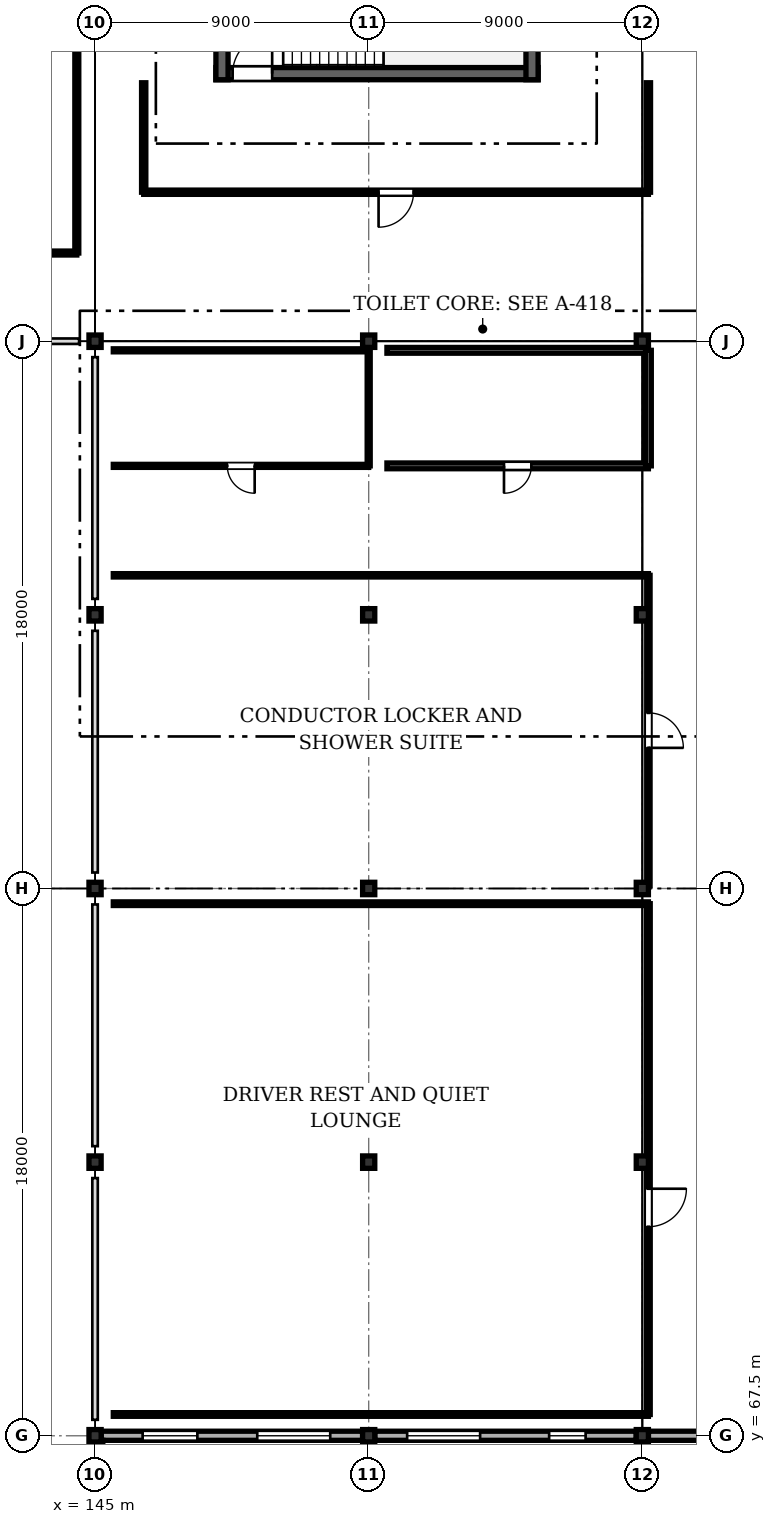
"""IFC4 building model, lengths in metres.
Left out: names, types, materials, properties, quantities, classifications, styles, units other than length and angle.
Written with IfcOpenShell. Run it as: python <this file> out.ifc"""

import sys

from ifc_helpers import new_model, si_unit, direction, frame, frame_2d, origin, origin_2d, place, context, subcontext, project, spatial, rectangle, i_section, extrude, element, fill, save


model = new_model("IFC4")
c1 = context("Model", 3, precision=1e-05, world=origin(), true_north=direction((0.0, 1.0)))
c2 = subcontext(c1, "Body", "Model", "MODEL_VIEW")
j1 = project(units=[si_unit("LENGTHUNIT", "METRE"), si_unit("PLANEANGLEUNIT", "RADIAN")], contexts=[c1])
p1 = place(None, origin())
s1 = spatial("IfcSite", under=j1, at=p1, CompositionType="ELEMENT")
p2 = place(p1, origin())
s2 = spatial("IfcBuilding", under=s1, at=p2, CompositionType="ELEMENT")
p3 = place(p2, frame((0.0, 0.0, 10.8)))
s3 = spatial("IfcBuildingStorey", under=s2, at=p3, CompositionType="ELEMENT", Elevation=10.8)
for number, where, z_axis, x_axis in (
    (1, (145.0, 67.5, 0.0), (0.0, 0.0, 1.0), (1.0, 0.0, 0.0)),
    (2, (145.0, 76.5, 0.0), (0.0, 0.0, 1.0), (1.0, 0.0, 0.0)),
    (3, (145.0, 85.5, 0.0), (0.0, 0.0, 1.0), (1.0, 0.0, 0.0)),
    (4, (145.0, 94.5, 0.0), (0.0, 0.0, 1.0), (1.0, 0.0, 0.0)),
    (5, (145.0, 103.5, 0.0), (0.0, 0.0, 1.0), (1.0, 0.0, 0.0)),
    (6, (154.0, 67.5, 0.0), (0.0, 0.0, 1.0), (1.0, 0.0, 0.0)),
    (7, (154.0, 76.5, 0.0), (0.0, 0.0, 1.0), (1.0, 0.0, 0.0)),
    (8, (154.0, 85.5, 0.0), (0.0, 0.0, 1.0), (1.0, 0.0, 0.0)),
    (9, (154.0, 94.5, 0.0), (0.0, 0.0, 1.0), (1.0, 0.0, 0.0)),
    (10, (154.0, 103.5, 0.0), (0.0, 0.0, 1.0), (1.0, 0.0, 0.0)),
    (11, (163.0, 67.5, 0.0), (0.0, 0.0, 1.0), (1.0, 0.0, 0.0)),
    (12, (163.0, 76.5, 0.0), (0.0, 0.0, 1.0), (1.0, 0.0, 0.0)),
    (13, (163.0, 85.5, 0.0), (0.0, 0.0, 1.0), (1.0, 0.0, 0.0)),
    (14, (163.0, 94.5, 0.0), (0.0, 0.0, 1.0), (1.0, 0.0, 0.0)),
    (15, (163.0, 103.5, 0.0), (0.0, 0.0, 1.0), (1.0, 0.0, 0.0)),
):
    element("IfcColumn", number, at=place(p3, frame(where, z_axis=z_axis, x_axis=x_axis)), inside=s3, PredefinedType="COLUMN", context=c2, shape_type="SweptSolid", body=[
        extrude(i_section(OverallWidth=0.4, OverallDepth=0.408, WebThickness=0.021, FlangeThickness=0.021, FilletRadius=0.022, at=origin_2d()), origin(), (0.0, 0.0, 1.0), 3.6),
    ])
p4 = place(p3, frame((171.8, 67.5, 0.0), z_axis=(0.0, 0.0, 1.0), x_axis=(-1.0, 0.0, 0.0)))
e16 = element("IfcWall", 16, at=p4, inside=s3, PredefinedType="SOLIDWALL", context=c2, shape_type="SweptSolid", body=[
    extrude(rectangle(XDim=8.6, YDim=0.3, at=frame_2d((4.3, 0.0))), origin(), (0.0, 0.0, 1.0), 2.915),
])
p5 = place(p4, frame((1.515, 0.0, 0.9)))
e17 = element("IfcOpeningElement", 17, at=p5, cuts=e16, PredefinedType="OPENING", context=c2, shape_type="SweptSolid", body=[
    extrude(rectangle(XDim=1.5, YDim=1.6, at=frame_2d((0.75, 0.8))), frame((0.0, 0.16, 0.0), z_axis=(0.0, -1.0, 0.0), x_axis=(1.0, 0.0, 0.0)), (0.0, 0.0, 1.0), 0.32),
])
p6 = place(p4, frame((5.735, 0.0, 0.9)))
e18 = element("IfcOpeningElement", 18, at=p6, cuts=e16, PredefinedType="OPENING", context=c2, shape_type="SweptSolid", body=[
    extrude(rectangle(XDim=1.2, YDim=1.6, at=frame_2d((0.6, 0.8))), frame((0.0, 0.16, 0.0), z_axis=(0.0, -1.0, 0.0), x_axis=(1.0, 0.0, 0.0)), (0.0, 0.0, 1.0), 0.32),
])
p7 = place(p3, frame((162.8, 67.5, 0.0), z_axis=(0.0, 0.0, 1.0), x_axis=(-1.0, 0.0, 0.0)))
e19 = element("IfcWall", 19, at=p7, inside=s3, PredefinedType="SOLIDWALL", context=c2, shape_type="SweptSolid", body=[
    extrude(rectangle(XDim=8.6, YDim=0.3, at=frame_2d((4.3, 0.0))), origin(), (0.0, 0.0, 1.0), 2.915),
])
p8 = place(p7, frame((1.665, 0.0, 0.9)))
e20 = element("IfcOpeningElement", 20, at=p8, cuts=e19, PredefinedType="OPENING", context=c2, shape_type="SweptSolid", body=[
    extrude(rectangle(XDim=1.2, YDim=1.6, at=frame_2d((0.6, 0.8))), frame((0.0, 0.16, 0.0), z_axis=(0.0, -1.0, 0.0), x_axis=(1.0, 0.0, 0.0)), (0.0, 0.0, 1.0), 0.32),
])
p9 = place(p7, frame((5.135, 0.0, 0.9)))
e21 = element("IfcOpeningElement", 21, at=p9, cuts=e19, PredefinedType="OPENING", context=c2, shape_type="SweptSolid", body=[
    extrude(rectangle(XDim=2.4, YDim=1.5, at=frame_2d((1.2, 0.75))), frame((0.0, 0.16, 0.0), z_axis=(0.0, -1.0, 0.0), x_axis=(1.0, 0.0, 0.0)), (0.0, 0.0, 1.0), 0.32),
])
p10 = place(p3, frame((153.8, 67.5, 0.0), z_axis=(0.0, 0.0, 1.0), x_axis=(-1.0, 0.0, 0.0)))
e22 = element("IfcWall", 22, at=p10, inside=s3, PredefinedType="SOLIDWALL", context=c2, shape_type="SweptSolid", body=[
    extrude(rectangle(XDim=8.6, YDim=0.3, at=frame_2d((4.3, 0.0))), origin(), (0.0, 0.0, 1.0), 2.915),
])
p11 = place(p10, frame((1.065, 0.0, 0.9)))
e23 = element("IfcOpeningElement", 23, at=p11, cuts=e22, PredefinedType="OPENING", context=c2, shape_type="SweptSolid", body=[
    extrude(rectangle(XDim=2.4, YDim=1.5, at=frame_2d((1.2, 0.75))), frame((0.0, 0.16, 0.0), z_axis=(0.0, -1.0, 0.0), x_axis=(1.0, 0.0, 0.0)), (0.0, 0.0, 1.0), 0.32),
])
p12 = place(p10, frame((5.435, 0.0, 0.9)))
e24 = element("IfcOpeningElement", 24, at=p12, cuts=e22, PredefinedType="OPENING", context=c2, shape_type="SweptSolid", body=[
    extrude(rectangle(XDim=1.8, YDim=1.5, at=frame_2d((0.9, 0.75))), frame((0.0, 0.16, 0.0), z_axis=(0.0, -1.0, 0.0), x_axis=(1.0, 0.0, 0.0)), (0.0, 0.0, 1.0), 0.32),
])
p13 = place(p3, frame((145.15, 54.15, 0.0), z_axis=(0.0, 0.0, 1.0), x_axis=(0.0, 1.0, 0.0)))
e25 = element("IfcWall", 25, at=p13, inside=s3, PredefinedType="PARAPET", context=c2, shape_type="SweptSolid", body=[
    extrude(rectangle(XDim=13.2, YDim=0.21, at=frame_2d((6.6, 0.0))), origin(), (0.0, 0.0, 1.0), 1.2),
])
p14 = place(p3, frame((148.975, 112.3, 0.0), z_axis=(0.0, 0.0, 1.0), x_axis=(1.0, 0.0, 0.0)))
e26 = element("IfcWall", 26, at=p14, inside=s3, PredefinedType="SHEAR", context=c2, shape_type="SweptSolid", body=[
    extrude(rectangle(XDim=10.597, YDim=0.4, at=frame_2d((5.299, 0.0))), origin(), (0.0, 0.0, 1.0), 3.38),
])
p15 = place(p14, frame((0.55, 0.0, 0.0)))
e27 = element("IfcOpeningElement", 27, at=p15, cuts=e26, PredefinedType="OPENING", context=c2, shape_type="SweptSolid", body=[
    extrude(rectangle(XDim=1.3, YDim=2.1, at=frame_2d((0.65, 1.05))), frame((0.0, 0.21, 0.0), z_axis=(0.0, -1.0, 0.0), x_axis=(1.0, 0.0, 0.0)), (0.0, 0.0, 1.0), 0.42),
])
for number, where, z_axis, x_axis in (
    (28, (159.373, 112.1, 0.0), (0.0, 0.0, 1.0), (0.0, 1.0, 0.0)),
    (29, (149.175, 116.52, 0.0), (0.0, 0.0, 1.0), (0.0, -1.0, 0.0)),
):
    element("IfcWall", number, at=place(p3, frame(where, z_axis=z_axis, x_axis=x_axis)), inside=s3, PredefinedType="SHEAR", context=c2, shape_type="SweptSolid", body=[
        extrude(rectangle(XDim=4.42, YDim=0.4, at=frame_2d((2.21, 0.0))), origin(), (0.0, 0.0, 1.0), 3.38),
    ])
p16 = place(p3, frame((144.4, 106.4, 0.0), z_axis=(0.0, 0.0, 1.0), x_axis=(-1.0, 0.0, 0.0)))
e30 = element("IfcWall", 30, at=p16, inside=s3, PredefinedType="PARTITIONING", context=c2, shape_type="SweptSolid", body=[
    extrude(rectangle(XDim=26.8, YDim=0.13, at=frame_2d((13.4, 0.0))), origin(), (0.0, 0.0, 1.0), 2.755),
])
p17 = place(p3, frame((144.4, 125.4, 0.0), z_axis=(0.0, 0.0, 1.0), x_axis=(0.0, -1.0, 0.0)))
e31 = element("IfcWall", 31, at=p17, inside=s3, PredefinedType="PARTITIONING", context=c2, shape_type="SweptSolid", body=[
    extrude(rectangle(XDim=19.0, YDim=0.13, at=frame_2d((9.5, 0.0))), origin(), (0.0, 0.0, 1.0), 2.755),
])
p18 = place(p17, frame((9.225, 0.0, 0.0)))
e32 = element("IfcOpeningElement", 32, at=p18, cuts=e31, PredefinedType="OPENING", context=c2, shape_type="SweptSolid", body=[
    extrude(rectangle(XDim=1.55, YDim=2.1, at=frame_2d((0.775, 1.05))), frame((0.0, 0.075, 0.0), z_axis=(0.0, -1.0, 0.0), x_axis=(1.0, 0.0, 0.0)), (0.0, 0.0, 1.0), 0.15),
])
for number, where, z_axis, x_axis in (
    (33, (163.2, 68.2, 0.0), (0.0, 0.0, 1.0), (-1.0, 0.0, 0.0)),
    (34, (145.6, 85.0, 0.0), (0.0, 0.0, 1.0), (1.0, 0.0, 0.0)),
):
    element("IfcWall", number, at=place(p3, frame(where, z_axis=z_axis, x_axis=x_axis)), inside=s3, PredefinedType="PARTITIONING", context=c2, shape_type="SweptSolid", body=[
        extrude(rectangle(XDim=17.6, YDim=0.12, at=frame_2d((8.8, 0.0))), origin(), (0.0, 0.0, 1.0), 2.915),
    ])
p19 = place(p3, frame((163.2, 85.0, 0.0), z_axis=(0.0, 0.0, 1.0), x_axis=(0.0, -1.0, 0.0)))
e35 = element("IfcWall", 35, at=p19, inside=s3, PredefinedType="PARTITIONING", context=c2, shape_type="SweptSolid", body=[
    extrude(rectangle(XDim=16.8, YDim=0.12, at=frame_2d((8.4, 0.0))), origin(), (0.0, 0.0, 1.0), 2.915),
])
p20 = place(p19, frame((9.375, 0.0, 0.0)))
e36 = element("IfcOpeningElement", 36, at=p20, cuts=e35, PredefinedType="OPENING", context=c2, shape_type="SweptSolid", body=[
    extrude(rectangle(XDim=1.25, YDim=2.1, at=frame_2d((0.625, 1.05))), frame((0.0, 0.07, 0.0), z_axis=(0.0, -1.0, 0.0), x_axis=(1.0, 0.0, 0.0)), (0.0, 0.0, 1.0), 0.14),
])
p21 = place(p3, frame((145.6, 95.8, 0.0), z_axis=(0.0, 0.0, 1.0), x_axis=(1.0, 0.0, 0.0)))
e37 = element("IfcWall", 37, at=p21, inside=s3, PredefinedType="PARTITIONING", context=c2, shape_type="SweptSolid", body=[
    extrude(rectangle(XDim=17.6, YDim=0.11, at=frame_2d((8.8, 0.0))), origin(), (0.0, 0.0, 1.0), 2.965),
])
p22 = place(p3, frame((163.2, 95.8, 0.0), z_axis=(0.0, 0.0, 1.0), x_axis=(0.0, -1.0, 0.0)))
e38 = element("IfcWall", 38, at=p22, inside=s3, PredefinedType="PARTITIONING", context=c2, shape_type="SweptSolid", body=[
    extrude(rectangle(XDim=10.2, YDim=0.11, at=frame_2d((5.1, 0.0))), origin(), (0.0, 0.0, 1.0), 2.915),
])
p23 = place(p22, frame((4.525, 0.0, 0.0)))
e39 = element("IfcOpeningElement", 39, at=p23, cuts=e38, PredefinedType="OPENING", context=c2, shape_type="SweptSolid", body=[
    extrude(rectangle(XDim=1.15, YDim=2.1, at=frame_2d((0.575, 1.05))), frame((0.0, 0.065, 0.0), z_axis=(0.0, -1.0, 0.0), x_axis=(1.0, 0.0, 0.0)), (0.0, 0.0, 1.0), 0.13),
])
p24 = place(p3, frame((154.0, 99.4, 0.0), z_axis=(0.0, 0.0, 1.0), x_axis=(-1.0, 0.0, 0.0)))
e40 = element("IfcWall", 40, at=p24, inside=s3, PredefinedType="PARTITIONING", context=c2, shape_type="SweptSolid", body=[
    extrude(rectangle(XDim=8.4, YDim=0.1, at=frame_2d((4.2, 0.0))), origin(), (0.0, 0.0, 1.0), 2.965),
])
p25 = place(p24, frame((3.75, 0.0, 0.0)))
e41 = element("IfcOpeningElement", 41, at=p25, cuts=e40, PredefinedType="OPENING", context=c2, shape_type="SweptSolid", body=[
    extrude(rectangle(XDim=0.9, YDim=2.1, at=frame_2d((0.45, 1.05))), frame((0.0, 0.06, 0.0), z_axis=(0.0, -1.0, 0.0), x_axis=(1.0, 0.0, 0.0)), (0.0, 0.0, 1.0), 0.12),
])
p26 = place(p3, frame((145.6, 103.2, 0.0), z_axis=(0.0, 0.0, 1.0), x_axis=(1.0, 0.0, 0.0)))
e42 = element("IfcWall", 42, at=p26, inside=s3, PredefinedType="PARTITIONING", context=c2, shape_type="SweptSolid", body=[
    extrude(rectangle(XDim=8.4, YDim=0.1, at=frame_2d((4.2, 0.0))), origin(), (0.0, 0.0, 1.0), 2.755),
])
p27 = place(p3, frame((154.0, 103.2, 0.0), z_axis=(0.0, 0.0, 1.0), x_axis=(0.0, -1.0, 0.0)))
e43 = element("IfcWall", 43, at=p27, inside=s3, PredefinedType="PARTITIONING", context=c2, shape_type="SweptSolid", body=[
    extrude(rectangle(XDim=3.8, YDim=0.1, at=frame_2d((1.9, 0.0))), origin(), (0.0, 0.0, 1.0), 2.915),
])
p28 = place(p3, frame((163.2, 99.4, 0.0), z_axis=(0.0, 0.0, 1.0), x_axis=(-1.0, 0.0, 0.0)))
e44 = element("IfcWall", 44, at=p28, inside=s3, PredefinedType="PARTITIONING", context=c2, shape_type="SweptSolid", body=[
    extrude(rectangle(XDim=8.6, YDim=0.19, at=frame_2d((4.3, 0.0))), origin(), (0.0, 0.0, 1.0), 2.965),
])
p29 = place(p28, frame((3.85, 0.0, 0.0)))
e45 = element("IfcOpeningElement", 45, at=p29, cuts=e44, PredefinedType="OPENING", context=c2, shape_type="SweptSolid", body=[
    extrude(rectangle(XDim=0.9, YDim=2.1, at=frame_2d((0.45, 1.05))), frame((0.0, 0.105, 0.0), z_axis=(0.0, -1.0, 0.0), x_axis=(1.0, 0.0, 0.0)), (0.0, 0.0, 1.0), 0.21),
])
p30 = place(p3, frame((154.6, 103.2, 0.0), z_axis=(0.0, 0.0, 1.0), x_axis=(1.0, 0.0, 0.0)))
e46 = element("IfcWall", 46, at=p30, inside=s3, PredefinedType="PARTITIONING", context=c2, shape_type="SweptSolid", body=[
    extrude(rectangle(XDim=8.6, YDim=0.19, at=frame_2d((4.3, 0.0))), origin(), (0.0, 0.0, 1.0), 2.755),
])
p31 = place(p3, frame((163.2, 103.2, 0.0), z_axis=(0.0, 0.0, 1.0), x_axis=(0.0, -1.0, 0.0)))
e47 = element("IfcWall", 47, at=p31, inside=s3, PredefinedType="PARTITIONING", context=c2, shape_type="SweptSolid", body=[
    extrude(rectangle(XDim=3.8, YDim=0.19, at=frame_2d((1.9, 0.0))), origin(), (0.0, 0.0, 1.0), 2.755),
])
p32 = place(p3, frame((163.2, 108.4, 0.0), z_axis=(0.0, 0.0, 1.0), x_axis=(-1.0, 0.0, 0.0)))
e48 = element("IfcWall", 48, at=p32, inside=s3, PredefinedType="PARTITIONING", context=c2, shape_type="SweptSolid", body=[
    extrude(rectangle(XDim=16.6, YDim=0.14, at=frame_2d((8.3, 0.0))), origin(), (0.0, 0.0, 1.0), 2.755),
])
p33 = place(p32, frame((7.725, 0.0, 0.0)))
e49 = element("IfcOpeningElement", 49, at=p33, cuts=e48, PredefinedType="OPENING", context=c2, shape_type="SweptSolid", body=[
    extrude(rectangle(XDim=1.15, YDim=2.1, at=frame_2d((0.575, 1.05))), frame((0.0, 0.08, 0.0), z_axis=(0.0, -1.0, 0.0), x_axis=(1.0, 0.0, 0.0)), (0.0, 0.0, 1.0), 0.16),
])
p34 = place(p3, frame((146.6, 108.4, 0.0), z_axis=(0.0, 0.0, 1.0), x_axis=(0.0, 1.0, 0.0)))
e50 = element("IfcWall", 50, at=p34, inside=s3, PredefinedType="PARTITIONING", context=c2, shape_type="SweptSolid", body=[
    extrude(rectangle(XDim=3.6, YDim=0.14, at=frame_2d((1.8, 0.0))), origin(), (0.0, 0.0, 1.0), 3.355),
])
p35 = place(p3, frame((163.2, 112.0, 0.0), z_axis=(0.0, 0.0, 1.0), x_axis=(0.0, -1.0, 0.0)))
e51 = element("IfcWall", 51, at=p35, inside=s3, PredefinedType="PARTITIONING", context=c2, shape_type="SweptSolid", body=[
    extrude(rectangle(XDim=3.6, YDim=0.14, at=frame_2d((1.8, 0.0))), origin(), (0.0, 0.0, 1.0), 2.755),
])
p36 = place(p8, origin())
e52 = element("IfcWindow", 52, at=p36, inside=s3, PartitioningType="SINGLE_PANEL", PredefinedType="WINDOW", context=c2, shape_type="SweptSolid", body=[
    extrude(rectangle(XDim=1.2, YDim=1.6, at=frame_2d((0.6, 0.8))), frame((0.0, 0.03, 0.0), z_axis=(0.0, -1.0, 0.0), x_axis=(1.0, 0.0, 0.0)), (0.0, 0.0, 1.0), 0.06),
])
fill(e20, e52)
p37 = place(p9, origin())
e53 = element("IfcWindow", 53, at=p37, inside=s3, PartitioningType="SINGLE_PANEL", PredefinedType="WINDOW", context=c2, shape_type="SweptSolid", body=[
    extrude(rectangle(XDim=2.4, YDim=1.5, at=frame_2d((1.2, 0.75))), frame((0.0, 0.03, 0.0), z_axis=(0.0, -1.0, 0.0), x_axis=(1.0, 0.0, 0.0)), (0.0, 0.0, 1.0), 0.06),
])
fill(e21, e53)
p38 = place(p11, origin())
e54 = element("IfcWindow", 54, at=p38, inside=s3, PartitioningType="SINGLE_PANEL", PredefinedType="WINDOW", context=c2, shape_type="SweptSolid", body=[
    extrude(rectangle(XDim=2.4, YDim=1.5, at=frame_2d((1.2, 0.75))), frame((0.0, 0.03, 0.0), z_axis=(0.0, -1.0, 0.0), x_axis=(1.0, 0.0, 0.0)), (0.0, 0.0, 1.0), 0.06),
])
fill(e23, e54)
p39 = place(p12, origin())
e55 = element("IfcWindow", 55, at=p39, inside=s3, PartitioningType="SINGLE_PANEL", PredefinedType="WINDOW", context=c2, shape_type="SweptSolid", body=[
    extrude(rectangle(XDim=1.8, YDim=1.5, at=frame_2d((0.9, 0.75))), frame((0.0, 0.03, 0.0), z_axis=(0.0, -1.0, 0.0), x_axis=(1.0, 0.0, 0.0)), (0.0, 0.0, 1.0), 0.06),
])
fill(e24, e55)
p40 = place(p15, origin())
e56 = element("IfcDoor", 56, at=p40, inside=s3, OperationType="SINGLE_SWING_RIGHT", PredefinedType="DOOR", context=c2, shape_type="SweptSolid", body=[
    extrude(rectangle(XDim=1.3, YDim=2.1, at=frame_2d((0.65, 1.05))), frame((0.0, 0.025, 0.0), z_axis=(0.0, -1.0, 0.0), x_axis=(1.0, 0.0, 0.0)), (0.0, 0.0, 1.0), 0.05),
])
fill(e27, e56)
p41 = place(p20, origin())
e57 = element("IfcDoor", 57, at=p41, inside=s3, OperationType="SINGLE_SWING_LEFT", PredefinedType="DOOR", context=c2, shape_type="SweptSolid", body=[
    extrude(rectangle(XDim=1.25, YDim=2.1, at=frame_2d((0.625, 1.05))), frame((0.0, 0.025, 0.0), z_axis=(0.0, -1.0, 0.0), x_axis=(1.0, 0.0, 0.0)), (0.0, 0.0, 1.0), 0.05),
])
fill(e36, e57)
p42 = place(p23, origin())
e58 = element("IfcDoor", 58, at=p42, inside=s3, OperationType="SINGLE_SWING_RIGHT", PredefinedType="DOOR", context=c2, shape_type="SweptSolid", body=[
    extrude(rectangle(XDim=1.15, YDim=2.1, at=frame_2d((0.575, 1.05))), frame((0.0, 0.025, 0.0), z_axis=(0.0, -1.0, 0.0), x_axis=(1.0, 0.0, 0.0)), (0.0, 0.0, 1.0), 0.05),
])
fill(e39, e58)
p43 = place(p25, origin())
e59 = element("IfcDoor", 59, at=p43, inside=s3, OperationType="SINGLE_SWING_LEFT", PredefinedType="DOOR", context=c2, shape_type="SweptSolid", body=[
    extrude(rectangle(XDim=0.9, YDim=2.1, at=frame_2d((0.45, 1.05))), frame((0.0, 0.025, 0.0), z_axis=(0.0, -1.0, 0.0), x_axis=(1.0, 0.0, 0.0)), (0.0, 0.0, 1.0), 0.05),
])
fill(e41, e59)
p44 = place(p29, origin())
e60 = element("IfcDoor", 60, at=p44, inside=s3, OperationType="SINGLE_SWING_RIGHT", PredefinedType="DOOR", context=c2, shape_type="SweptSolid", body=[
    extrude(rectangle(XDim=0.9, YDim=2.1, at=frame_2d((0.45, 1.05))), frame((0.0, 0.025, 0.0), z_axis=(0.0, -1.0, 0.0), x_axis=(1.0, 0.0, 0.0)), (0.0, 0.0, 1.0), 0.05),
])
fill(e45, e60)
p45 = place(p33, origin())
e61 = element("IfcDoor", 61, at=p45, inside=s3, OperationType="SINGLE_SWING_RIGHT", PredefinedType="DOOR", context=c2, shape_type="SweptSolid", body=[
    extrude(rectangle(XDim=1.15, YDim=2.1, at=frame_2d((0.575, 1.05))), frame((0.0, 0.025, 0.0), z_axis=(0.0, -1.0, 0.0), x_axis=(1.0, 0.0, 0.0)), (0.0, 0.0, 1.0), 0.05),
])
fill(e49, e61)
save(model, sys.argv[1])
